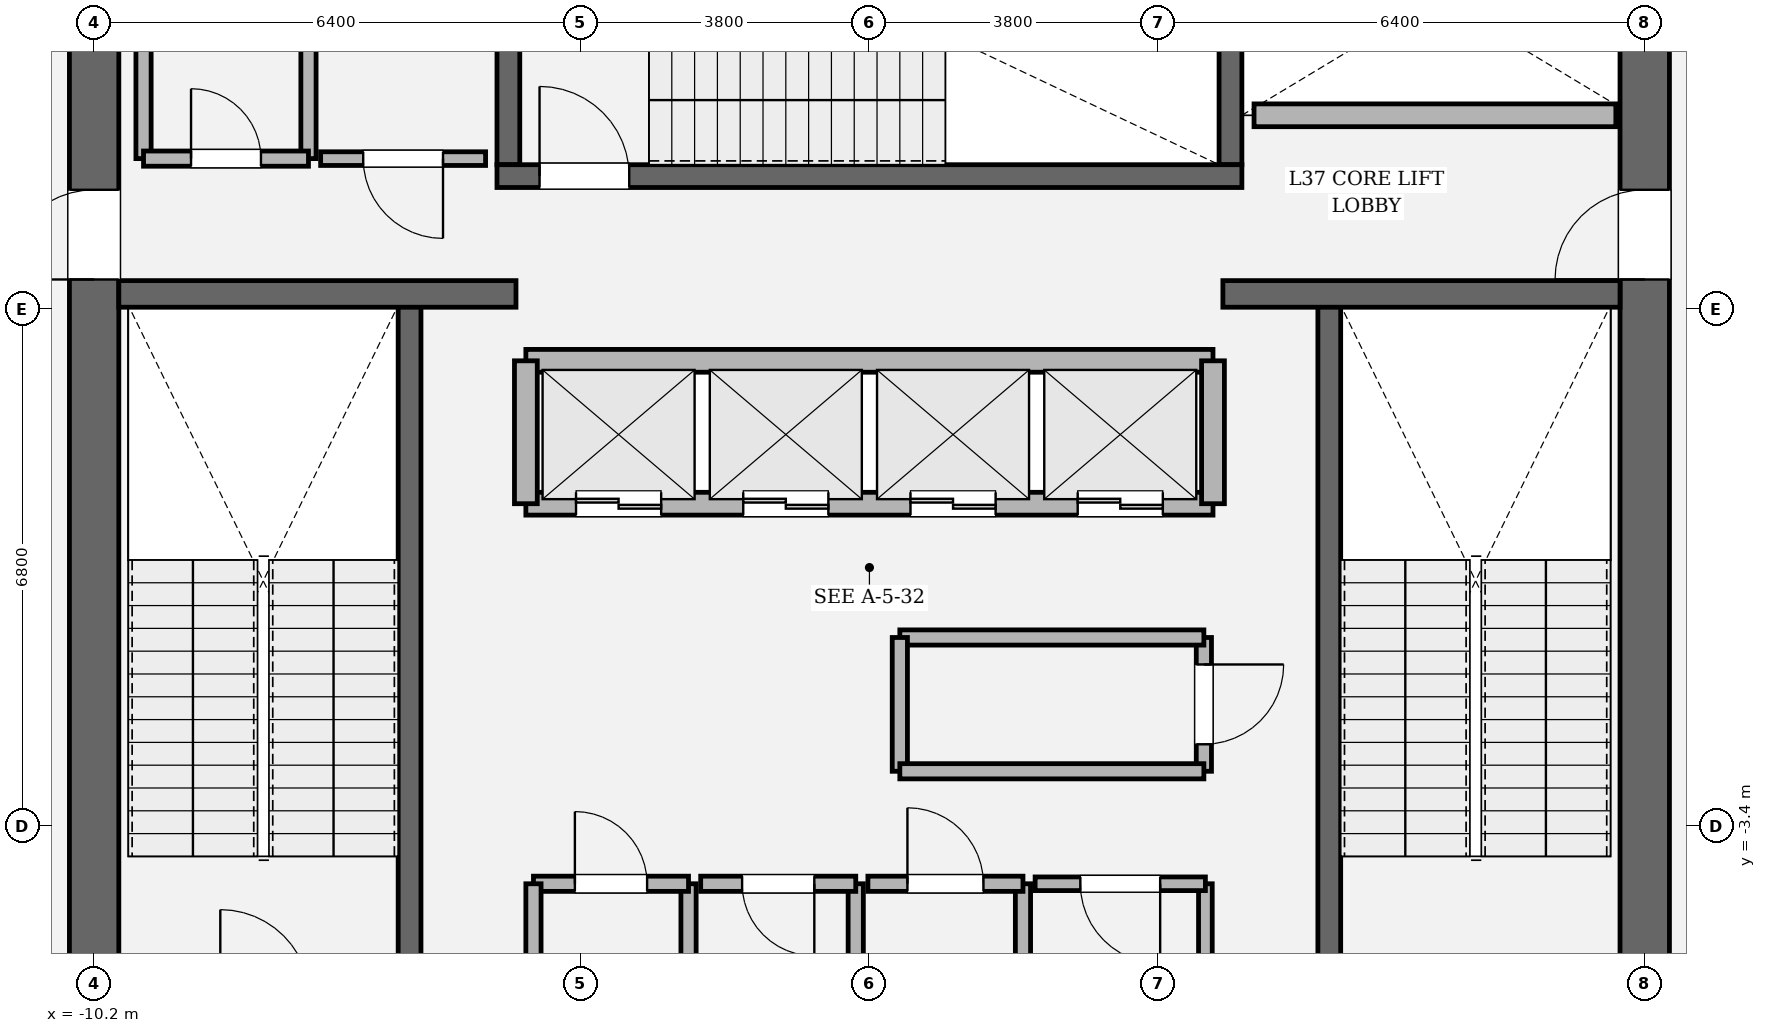
"""IFC4 building model, lengths in metres.
Left out: names, types, materials, properties, quantities, classifications, styles, units other than length and angle.
Written with IfcOpenShell. Run it as: python <this file> out.ifc"""

import sys

from ifc_helpers import new_model, si_unit, direction, frame, frame_2d, origin, place, context, subcontext, project, spatial, rectangle, extrude, element, fill, save


model = new_model("IFC4")
c1 = context("Model", 3, precision=1e-05, world=origin(), true_north=direction((0.0, 1.0)))
c2 = subcontext(c1, "Body", "Model", "MODEL_VIEW")
j1 = project(units=[si_unit("LENGTHUNIT", "METRE"), si_unit("PLANEANGLEUNIT", "RADIAN")], contexts=[c1])
p1 = place(None, origin())
s1 = spatial("IfcSite", under=j1, at=p1, CompositionType="ELEMENT")
p2 = place(p1, origin())
s2 = spatial("IfcBuilding", under=s1, at=p2, CompositionType="ELEMENT")
p3 = place(p2, frame((0.0, 0.0, 160.05)))
s3 = spatial("IfcBuildingStorey", under=s2, at=p3, CompositionType="ELEMENT", Elevation=160.05)
p4 = place(p3, frame((-10.2, -8.875, 0.0), z_axis=(0.0, 0.0, 1.0), x_axis=(0.0, 1.0, 0.0)))
e1 = element("IfcWall", 1, at=p4, inside=s3, PredefinedType="SHEAR", context=c2, shape_type="SweptSolid", body=[
    extrude(rectangle(XDim=17.75, YDim=0.65, at=frame_2d((8.875, 0.0))), origin(), (0.0, 0.0, 1.0), 4.05),
])
p5 = place(p4, frame((12.665, 0.0, 0.0)))
e2 = element("IfcOpeningElement", 2, at=p5, cuts=e1, PredefinedType="OPENING", context=c2, shape_type="SweptSolid", body=[
    extrude(rectangle(XDim=1.18, YDim=2.2, at=frame_2d((0.59, 1.1))), frame((0.0, 0.335, 0.0), z_axis=(0.0, -1.0, 0.0), x_axis=(1.0, 0.0, 0.0)), (0.0, 0.0, 1.0), 0.67),
])
p6 = place(p3, frame((10.2, 8.875, 0.0), z_axis=(0.0, 0.0, 1.0), x_axis=(0.0, -1.0, 0.0)))
e3 = element("IfcWall", 3, at=p6, inside=s3, PredefinedType="SHEAR", context=c2, shape_type="SweptSolid", body=[
    extrude(rectangle(XDim=17.75, YDim=0.65, at=frame_2d((8.875, 0.0))), origin(), (0.0, 0.0, 1.0), 4.05),
])
p7 = place(p6, frame((3.905, 0.0, 0.0)))
e4 = element("IfcOpeningElement", 4, at=p7, cuts=e3, PredefinedType="OPENING", context=c2, shape_type="SweptSolid", body=[
    extrude(rectangle(XDim=1.18, YDim=2.2, at=frame_2d((0.59, 1.1))), frame((0.0, 0.335, 0.0), z_axis=(0.0, -1.0, 0.0), x_axis=(1.0, 0.0, 0.0)), (0.0, 0.0, 1.0), 0.67),
])
for number, where, z_axis, x_axis in (
    (5, (-6.05, -5.5, 0.0), (0.0, 0.0, 1.0), (0.0, 1.0, 0.0)),
    (6, (6.05, 3.45, 0.0), (0.0, 0.0, 1.0), (0.0, -1.0, 0.0)),
):
    element("IfcWall", number, at=place(p3, frame(where, z_axis=z_axis, x_axis=x_axis)), inside=s3, PredefinedType="SOLIDWALL", context=c2, shape_type="SweptSolid", body=[
        extrude(rectangle(XDim=8.95, YDim=0.3, at=frame_2d((4.475, 0.0))), origin(), (0.0, 0.0, 1.0), 4.05),
    ])
for number, where, z_axis, x_axis in (
    (7, (-4.75, 5.3, 0.0), (0.0, 0.0, 1.0), (0.0, 1.0, 0.0)),
    (8, (4.75, 8.875, 0.0), (0.0, 0.0, 1.0), (0.0, -1.0, 0.0)),
):
    element("IfcWall", number, at=place(p3, frame(where, z_axis=z_axis, x_axis=x_axis)), inside=s3, PredefinedType="SOLIDWALL", context=c2, shape_type="SweptSolid", body=[
        extrude(rectangle(XDim=3.575, YDim=0.3, at=frame_2d((1.788, 0.0))), origin(), (0.0, 0.0, 1.0), 4.05),
    ])
p8 = place(p3, frame((-4.9, 5.15, 0.0), z_axis=(0.0, 0.0, 1.0), x_axis=(1.0, 0.0, 0.0)))
e9 = element("IfcWall", 9, at=p8, inside=s3, PredefinedType="SOLIDWALL", context=c2, shape_type="SweptSolid", body=[
    extrude(rectangle(XDim=9.8, YDim=0.3, at=frame_2d((4.9, 0.0))), origin(), (0.0, 0.0, 1.0), 4.05),
])
p9 = place(p8, frame((0.56, 0.0, 0.0)))
e10 = element("IfcOpeningElement", 10, at=p9, cuts=e9, PredefinedType="OPENING", context=c2, shape_type="SweptSolid", body=[
    extrude(rectangle(XDim=1.18, YDim=2.2, at=frame_2d((0.59, 1.1))), frame((0.0, 0.16, 0.0), z_axis=(0.0, -1.0, 0.0), x_axis=(1.0, 0.0, 0.0)), (0.0, 0.0, 1.0), 0.32),
])
for number, where, z_axis, x_axis in (
    (11, (-9.875, 3.6, 0.0), (0.0, 0.0, 1.0), (1.0, 0.0, 0.0)),
    (12, (4.65, 3.6, 0.0), (0.0, 0.0, 1.0), (1.0, 0.0, 0.0)),
):
    element("IfcWall", number, at=place(p3, frame(where, z_axis=z_axis, x_axis=x_axis)), inside=s3, PredefinedType="SOLIDWALL", context=c2, shape_type="SweptSolid", body=[
        extrude(rectangle(XDim=5.225, YDim=0.35, at=frame_2d((2.613, 0.0))), origin(), (0.0, 0.0, 1.0), 4.05),
    ])
p10 = place(p3, frame((-4.52, 0.84, 0.0), z_axis=(0.0, 0.0, 1.0), x_axis=(1.0, 0.0, 0.0)))
e13 = element("IfcWall", 13, at=p10, inside=s3, PredefinedType="SOLIDWALL", context=c2, shape_type="SweptSolid", body=[
    extrude(rectangle(XDim=9.04, YDim=0.3, at=frame_2d((4.52, 0.0))), origin(), (0.0, 0.0, 1.0), 3.83),
])
p11 = place(p10, frame((0.66, 0.0, 0.0)))
e14 = element("IfcOpeningElement", 14, at=p11, cuts=e13, PredefinedType="OPENING", context=c2, shape_type="SweptSolid", body=[
    extrude(rectangle(XDim=1.12, YDim=2.25, at=frame_2d((0.56, 1.125))), frame((0.0, 0.16, 0.0), z_axis=(0.0, -1.0, 0.0), x_axis=(1.0, 0.0, 0.0)), (0.0, 0.0, 1.0), 0.32),
])
p12 = place(p10, frame((2.86, 0.0, 0.0)))
e15 = element("IfcOpeningElement", 15, at=p12, cuts=e13, PredefinedType="OPENING", context=c2, shape_type="SweptSolid", body=[
    extrude(rectangle(XDim=1.12, YDim=2.25, at=frame_2d((0.56, 1.125))), frame((0.0, 0.16, 0.0), z_axis=(0.0, -1.0, 0.0), x_axis=(1.0, 0.0, 0.0)), (0.0, 0.0, 1.0), 0.32),
])
p13 = place(p10, frame((5.06, 0.0, 0.0)))
e16 = element("IfcOpeningElement", 16, at=p13, cuts=e13, PredefinedType="OPENING", context=c2, shape_type="SweptSolid", body=[
    extrude(rectangle(XDim=1.12, YDim=2.25, at=frame_2d((0.56, 1.125))), frame((0.0, 0.16, 0.0), z_axis=(0.0, -1.0, 0.0), x_axis=(1.0, 0.0, 0.0)), (0.0, 0.0, 1.0), 0.32),
])
p14 = place(p10, frame((7.26, 0.0, 0.0)))
e17 = element("IfcOpeningElement", 17, at=p14, cuts=e13, PredefinedType="OPENING", context=c2, shape_type="SweptSolid", body=[
    extrude(rectangle(XDim=1.12, YDim=2.25, at=frame_2d((0.56, 1.125))), frame((0.0, 0.16, 0.0), z_axis=(0.0, -1.0, 0.0), x_axis=(1.0, 0.0, 0.0)), (0.0, 0.0, 1.0), 0.32),
])
p15 = place(p3, frame((-4.52, 2.72, 0.0), z_axis=(0.0, 0.0, 1.0), x_axis=(1.0, 0.0, 0.0)))
e18 = element("IfcWall", 18, at=p15, inside=s3, PredefinedType="SOLIDWALL", context=c2, shape_type="SweptSolid", body=[
    extrude(rectangle(XDim=9.04, YDim=0.3, at=frame_2d((4.52, 0.0))), origin(), (0.0, 0.0, 1.0), 3.83),
])
for number, where, z_axis, x_axis in (
    (19, (-4.52, 0.84, 0.0), (0.0, 0.0, 1.0), (0.0, 1.0, 0.0)),
    (20, (4.52, 0.84, 0.0), (0.0, 0.0, 1.0), (0.0, 1.0, 0.0)),
):
    element("IfcWall", number, at=place(p3, frame(where, z_axis=z_axis, x_axis=x_axis)), inside=s3, PredefinedType="SOLIDWALL", context=c2, shape_type="SweptSolid", body=[
        extrude(rectangle(XDim=1.88, YDim=0.3, at=frame_2d((0.94, 0.0))), origin(), (0.0, 0.0, 1.0), 3.83),
    ])
p16 = place(p3, frame((5.06, 5.95, 0.0), z_axis=(0.0, 0.0, 1.0), x_axis=(1.0, 0.0, 0.0)))
e21 = element("IfcWall", 21, at=p16, inside=s3, PredefinedType="SOLIDWALL", context=c2, shape_type="SweptSolid", body=[
    extrude(rectangle(XDim=4.76, YDim=0.3, at=frame_2d((2.38, 0.0))), origin(), (0.0, 0.0, 1.0), 3.83),
])
p17 = place(p3, frame((-2.38, -5.9, 0.0), z_axis=(0.0, 0.0, 1.0), x_axis=(0.0, 1.0, 0.0)))
e22 = element("IfcWall", 22, at=p17, inside=s3, PredefinedType="SOLIDWALL", context=c2, shape_type="SweptSolid", body=[
    extrude(rectangle(XDim=1.74, YDim=0.2, at=frame_2d((0.87, 0.0))), origin(), (0.0, 0.0, 1.0), 3.83),
])
p18 = place(p3, frame((-2.38, -4.16, 0.0), z_axis=(0.0, 0.0, 1.0), x_axis=(-1.0, 0.0, 0.0)))
e23 = element("IfcWall", 23, at=p18, inside=s3, PredefinedType="SOLIDWALL", context=c2, shape_type="SweptSolid", body=[
    extrude(rectangle(XDim=2.04, YDim=0.2, at=frame_2d((1.02, 0.0))), origin(), (0.0, 0.0, 1.0), 3.83),
])
p19 = place(p18, frame((0.545, 0.0, 0.0)))
e24 = element("IfcOpeningElement", 24, at=p19, cuts=e23, PredefinedType="OPENING", context=c2, shape_type="SweptSolid", body=[
    extrude(rectangle(XDim=0.95, YDim=2.15, at=frame_2d((0.475, 1.075))), frame((0.0, 0.11, 0.0), z_axis=(0.0, -1.0, 0.0), x_axis=(1.0, 0.0, 0.0)), (0.0, 0.0, 1.0), 0.22),
])
for number, where, z_axis, x_axis in (
    (25, (-4.42, -4.16, 0.0), (0.0, 0.0, 1.0), (0.0, -1.0, 0.0)),
    (26, (-0.18, -5.9, 0.0), (0.0, 0.0, 1.0), (0.0, 1.0, 0.0)),
):
    element("IfcWall", number, at=place(p3, frame(where, z_axis=z_axis, x_axis=x_axis)), inside=s3, PredefinedType="SOLIDWALL", context=c2, shape_type="SweptSolid", body=[
        extrude(rectangle(XDim=1.74, YDim=0.2, at=frame_2d((0.87, 0.0))), origin(), (0.0, 0.0, 1.0), 3.83),
    ])
p20 = place(p3, frame((-0.18, -4.16, 0.0), z_axis=(0.0, 0.0, 1.0), x_axis=(-1.0, 0.0, 0.0)))
e27 = element("IfcWall", 27, at=p20, inside=s3, PredefinedType="SOLIDWALL", context=c2, shape_type="SweptSolid", body=[
    extrude(rectangle(XDim=2.04, YDim=0.2, at=frame_2d((1.02, 0.0))), origin(), (0.0, 0.0, 1.0), 3.83),
])
p21 = place(p20, frame((0.545, 0.0, 0.0)))
e28 = element("IfcOpeningElement", 28, at=p21, cuts=e27, PredefinedType="OPENING", context=c2, shape_type="SweptSolid", body=[
    extrude(rectangle(XDim=0.95, YDim=2.15, at=frame_2d((0.475, 1.075))), frame((0.0, 0.11, 0.0), z_axis=(0.0, -1.0, 0.0), x_axis=(1.0, 0.0, 0.0)), (0.0, 0.0, 1.0), 0.22),
])
p22 = place(p3, frame((2.02, -5.9, 0.0), z_axis=(0.0, 0.0, 1.0), x_axis=(0.0, 1.0, 0.0)))
e29 = element("IfcWall", 29, at=p22, inside=s3, PredefinedType="SOLIDWALL", context=c2, shape_type="SweptSolid", body=[
    extrude(rectangle(XDim=1.74, YDim=0.2, at=frame_2d((0.87, 0.0))), origin(), (0.0, 0.0, 1.0), 3.83),
])
p23 = place(p3, frame((2.02, -4.16, 0.0), z_axis=(0.0, 0.0, 1.0), x_axis=(-1.0, 0.0, 0.0)))
e30 = element("IfcWall", 30, at=p23, inside=s3, PredefinedType="SOLIDWALL", context=c2, shape_type="SweptSolid", body=[
    extrude(rectangle(XDim=2.04, YDim=0.2, at=frame_2d((1.02, 0.0))), origin(), (0.0, 0.0, 1.0), 3.83),
])
p24 = place(p23, frame((0.52, 0.0, 0.0)))
e31 = element("IfcOpeningElement", 31, at=p24, cuts=e30, PredefinedType="OPENING", context=c2, shape_type="SweptSolid", body=[
    extrude(rectangle(XDim=1.0, YDim=2.15, at=frame_2d((0.5, 1.075))), frame((0.0, 0.11, 0.0), z_axis=(0.0, -1.0, 0.0), x_axis=(1.0, 0.0, 0.0)), (0.0, 0.0, 1.0), 0.22),
])
p25 = place(p3, frame((4.42, -5.9, 0.0), z_axis=(0.0, 0.0, 1.0), x_axis=(0.0, 1.0, 0.0)))
e32 = element("IfcWall", 32, at=p25, inside=s3, PredefinedType="PARTITIONING", context=c2, shape_type="SweptSolid", body=[
    extrude(rectangle(XDim=1.74, YDim=0.18, at=frame_2d((0.87, 0.0))), origin(), (0.0, 0.0, 1.0), 3.83),
])
p26 = place(p3, frame((4.42, -4.16, 0.0), z_axis=(0.0, 0.0, 1.0), x_axis=(-1.0, 0.0, 0.0)))
e33 = element("IfcWall", 33, at=p26, inside=s3, PredefinedType="PARTITIONING", context=c2, shape_type="SweptSolid", body=[
    extrude(rectangle(XDim=2.24, YDim=0.18, at=frame_2d((1.12, 0.0))), origin(), (0.0, 0.0, 1.0), 3.83),
])
p27 = place(p26, frame((0.595, 0.0, 0.0)))
e34 = element("IfcOpeningElement", 34, at=p27, cuts=e33, PredefinedType="OPENING", context=c2, shape_type="SweptSolid", body=[
    extrude(rectangle(XDim=1.05, YDim=2.2, at=frame_2d((0.525, 1.1))), frame((0.0, 0.1, 0.0), z_axis=(0.0, -1.0, 0.0), x_axis=(1.0, 0.0, 0.0)), (0.0, 0.0, 1.0), 0.2),
])
p28 = place(p3, frame((4.4, -2.68, 0.0), z_axis=(0.0, 0.0, 1.0), x_axis=(0.0, 1.0, 0.0)))
e35 = element("IfcWall", 35, at=p28, inside=s3, PredefinedType="SOLIDWALL", context=c2, shape_type="SweptSolid", body=[
    extrude(rectangle(XDim=1.76, YDim=0.2, at=frame_2d((0.88, 0.0))), origin(), (0.0, 0.0, 1.0), 3.83),
])
p29 = place(p28, frame((0.355, 0.0, 0.0)))
e36 = element("IfcOpeningElement", 36, at=p29, cuts=e35, PredefinedType="OPENING", context=c2, shape_type="SweptSolid", body=[
    extrude(rectangle(XDim=1.05, YDim=2.2, at=frame_2d((0.525, 1.1))), frame((0.0, 0.11, 0.0), z_axis=(0.0, -1.0, 0.0), x_axis=(1.0, 0.0, 0.0)), (0.0, 0.0, 1.0), 0.22),
])
p30 = place(p3, frame((4.4, -0.92, 0.0), z_axis=(0.0, 0.0, 1.0), x_axis=(-1.0, 0.0, 0.0)))
e37 = element("IfcWall", 37, at=p30, inside=s3, PredefinedType="SOLIDWALL", context=c2, shape_type="SweptSolid", body=[
    extrude(rectangle(XDim=4.0, YDim=0.2, at=frame_2d((2.0, 0.0))), origin(), (0.0, 0.0, 1.0), 3.83),
])
p31 = place(p3, frame((0.4, -0.92, 0.0), z_axis=(0.0, 0.0, 1.0), x_axis=(0.0, -1.0, 0.0)))
e38 = element("IfcWall", 38, at=p31, inside=s3, PredefinedType="SOLIDWALL", context=c2, shape_type="SweptSolid", body=[
    extrude(rectangle(XDim=1.76, YDim=0.2, at=frame_2d((0.88, 0.0))), origin(), (0.0, 0.0, 1.0), 3.83),
])
p32 = place(p3, frame((0.4, -2.68, 0.0), z_axis=(0.0, 0.0, 1.0), x_axis=(1.0, 0.0, 0.0)))
e39 = element("IfcWall", 39, at=p32, inside=s3, PredefinedType="SOLIDWALL", context=c2, shape_type="SweptSolid", body=[
    extrude(rectangle(XDim=4.0, YDim=0.2, at=frame_2d((2.0, 0.0))), origin(), (0.0, 0.0, 1.0), 3.83),
])
for number, where, z_axis, x_axis in (
    (40, (-7.38, 5.38, 0.0), (0.0, 0.0, 1.0), (0.0, 1.0, 0.0)),
    (41, (-9.55, 8.65, 0.0), (0.0, 0.0, 1.0), (0.0, -1.0, 0.0)),
):
    element("IfcWall", number, at=place(p3, frame(where, z_axis=z_axis, x_axis=x_axis)), inside=s3, PredefinedType="SOLIDWALL", context=c2, shape_type="SweptSolid", body=[
        extrude(rectangle(XDim=3.27, YDim=0.2, at=frame_2d((1.635, 0.0))), origin(), (0.0, 0.0, 1.0), 3.83),
    ])
p33 = place(p3, frame((-9.55, 5.38, 0.0), z_axis=(0.0, 0.0, 1.0), x_axis=(1.0, 0.0, 0.0)))
e42 = element("IfcWall", 42, at=p33, inside=s3, PredefinedType="SOLIDWALL", context=c2, shape_type="SweptSolid", body=[
    extrude(rectangle(XDim=2.17, YDim=0.2, at=frame_2d((1.085, 0.0))), origin(), (0.0, 0.0, 1.0), 3.83),
])
p34 = place(p33, frame((0.625, 0.0, 0.0)))
e43 = element("IfcOpeningElement", 43, at=p34, cuts=e42, PredefinedType="OPENING", context=c2, shape_type="SweptSolid", body=[
    extrude(rectangle(XDim=0.92, YDim=2.1, at=frame_2d((0.46, 1.05))), frame((0.0, 0.11, 0.0), z_axis=(0.0, -1.0, 0.0), x_axis=(1.0, 0.0, 0.0)), (0.0, 0.0, 1.0), 0.22),
])
p35 = place(p3, frame((-7.22, 5.38, 0.0), z_axis=(0.0, 0.0, 1.0), x_axis=(1.0, 0.0, 0.0)))
e44 = element("IfcWall", 44, at=p35, inside=s3, PredefinedType="PARTITIONING", context=c2, shape_type="SweptSolid", body=[
    extrude(rectangle(XDim=2.17, YDim=0.18, at=frame_2d((1.085, 0.0))), origin(), (0.0, 0.0, 1.0), 3.83),
])
p36 = place(p35, frame((0.56, 0.0, 0.0)))
e45 = element("IfcOpeningElement", 45, at=p36, cuts=e44, PredefinedType="OPENING", context=c2, shape_type="SweptSolid", body=[
    extrude(rectangle(XDim=1.05, YDim=2.2, at=frame_2d((0.525, 1.1))), frame((0.0, 0.1, 0.0), z_axis=(0.0, -1.0, 0.0), x_axis=(1.0, 0.0, 0.0)), (0.0, 0.0, 1.0), 0.2),
])
p37 = place(p9, origin())
e46 = element("IfcDoor", 46, at=p37, inside=s3, OperationType="SINGLE_SWING_LEFT", PredefinedType="DOOR", context=c2, shape_type="SweptSolid", body=[
    extrude(rectangle(XDim=1.18, YDim=2.2, at=frame_2d((0.59, 1.1))), frame((0.0, 0.025, 0.0), z_axis=(0.0, -1.0, 0.0), x_axis=(1.0, 0.0, 0.0)), (0.0, 0.0, 1.0), 0.05),
])
fill(e10, e46)
p38 = place(p5, origin())
e47 = element("IfcDoor", 47, at=p38, inside=s3, OperationType="SINGLE_SWING_LEFT", PredefinedType="DOOR", context=c2, shape_type="SweptSolid", body=[
    extrude(rectangle(XDim=1.18, YDim=2.2, at=frame_2d((0.59, 1.1))), frame((0.0, 0.025, 0.0), z_axis=(0.0, -1.0, 0.0), x_axis=(1.0, 0.0, 0.0)), (0.0, 0.0, 1.0), 0.05),
])
fill(e2, e47)
p39 = place(p7, origin())
e48 = element("IfcDoor", 48, at=p39, inside=s3, OperationType="SINGLE_SWING_RIGHT", PredefinedType="DOOR", context=c2, shape_type="SweptSolid", body=[
    extrude(rectangle(XDim=1.18, YDim=2.2, at=frame_2d((0.59, 1.1))), frame((0.0, 0.025, 0.0), z_axis=(0.0, -1.0, 0.0), x_axis=(1.0, 0.0, 0.0)), (0.0, 0.0, 1.0), 0.05),
])
fill(e4, e48)
p40 = place(p11, origin())
e49 = element("IfcDoor", 49, at=p40, inside=s3, OperationType="DOUBLE_DOOR_SLIDING", PredefinedType="DOOR", context=c2, shape_type="SweptSolid", body=[
    extrude(rectangle(XDim=1.12, YDim=2.25, at=frame_2d((0.56, 1.125))), frame((0.0, 0.025, 0.0), z_axis=(0.0, -1.0, 0.0), x_axis=(1.0, 0.0, 0.0)), (0.0, 0.0, 1.0), 0.05),
])
fill(e14, e49)
p41 = place(p12, origin())
e50 = element("IfcDoor", 50, at=p41, inside=s3, OperationType="DOUBLE_DOOR_SLIDING", PredefinedType="DOOR", context=c2, shape_type="SweptSolid", body=[
    extrude(rectangle(XDim=1.12, YDim=2.25, at=frame_2d((0.56, 1.125))), frame((0.0, 0.025, 0.0), z_axis=(0.0, -1.0, 0.0), x_axis=(1.0, 0.0, 0.0)), (0.0, 0.0, 1.0), 0.05),
])
fill(e15, e50)
p42 = place(p13, origin())
e51 = element("IfcDoor", 51, at=p42, inside=s3, OperationType="DOUBLE_DOOR_SLIDING", PredefinedType="DOOR", context=c2, shape_type="SweptSolid", body=[
    extrude(rectangle(XDim=1.12, YDim=2.25, at=frame_2d((0.56, 1.125))), frame((0.0, 0.025, 0.0), z_axis=(0.0, -1.0, 0.0), x_axis=(1.0, 0.0, 0.0)), (0.0, 0.0, 1.0), 0.05),
])
fill(e16, e51)
p43 = place(p14, origin())
e52 = element("IfcDoor", 52, at=p43, inside=s3, OperationType="DOUBLE_DOOR_SLIDING", PredefinedType="DOOR", context=c2, shape_type="SweptSolid", body=[
    extrude(rectangle(XDim=1.12, YDim=2.25, at=frame_2d((0.56, 1.125))), frame((0.0, 0.025, 0.0), z_axis=(0.0, -1.0, 0.0), x_axis=(1.0, 0.0, 0.0)), (0.0, 0.0, 1.0), 0.05),
])
fill(e17, e52)
p44 = place(p19, origin())
e53 = element("IfcDoor", 53, at=p44, inside=s3, OperationType="SINGLE_SWING_RIGHT", PredefinedType="DOOR", context=c2, shape_type="SweptSolid", body=[
    extrude(rectangle(XDim=0.95, YDim=2.15, at=frame_2d((0.475, 1.075))), frame((0.0, 0.025, 0.0), z_axis=(0.0, -1.0, 0.0), x_axis=(1.0, 0.0, 0.0)), (0.0, 0.0, 1.0), 0.05),
])
fill(e24, e53)
p45 = place(p21, origin())
e54 = element("IfcDoor", 54, at=p45, inside=s3, OperationType="SINGLE_SWING_LEFT", PredefinedType="DOOR", context=c2, shape_type="SweptSolid", body=[
    extrude(rectangle(XDim=0.95, YDim=2.15, at=frame_2d((0.475, 1.075))), frame((0.0, 0.025, 0.0), z_axis=(0.0, -1.0, 0.0), x_axis=(1.0, 0.0, 0.0)), (0.0, 0.0, 1.0), 0.05),
])
fill(e28, e54)
p46 = place(p24, origin())
e55 = element("IfcDoor", 55, at=p46, inside=s3, OperationType="SINGLE_SWING_RIGHT", PredefinedType="DOOR", context=c2, shape_type="SweptSolid", body=[
    extrude(rectangle(XDim=1.0, YDim=2.15, at=frame_2d((0.5, 1.075))), frame((0.0, 0.025, 0.0), z_axis=(0.0, -1.0, 0.0), x_axis=(1.0, 0.0, 0.0)), (0.0, 0.0, 1.0), 0.05),
])
fill(e31, e55)
p47 = place(p27, origin())
e56 = element("IfcDoor", 56, at=p47, inside=s3, OperationType="SINGLE_SWING_LEFT", PredefinedType="DOOR", context=c2, shape_type="SweptSolid", body=[
    extrude(rectangle(XDim=1.05, YDim=2.2, at=frame_2d((0.525, 1.1))), frame((0.0, 0.025, 0.0), z_axis=(0.0, -1.0, 0.0), x_axis=(1.0, 0.0, 0.0)), (0.0, 0.0, 1.0), 0.05),
])
fill(e34, e56)
p48 = place(p29, origin())
e57 = element("IfcDoor", 57, at=p48, inside=s3, OperationType="SINGLE_SWING_RIGHT", PredefinedType="DOOR", context=c2, shape_type="SweptSolid", body=[
    extrude(rectangle(XDim=1.05, YDim=2.2, at=frame_2d((0.525, 1.1))), frame((0.0, 0.025, 0.0), z_axis=(0.0, -1.0, 0.0), x_axis=(1.0, 0.0, 0.0)), (0.0, 0.0, 1.0), 0.05),
])
fill(e36, e57)
p49 = place(p34, origin())
e58 = element("IfcDoor", 58, at=p49, inside=s3, OperationType="SINGLE_SWING_LEFT", PredefinedType="DOOR", context=c2, shape_type="SweptSolid", body=[
    extrude(rectangle(XDim=0.92, YDim=2.1, at=frame_2d((0.46, 1.05))), frame((0.0, 0.025, 0.0), z_axis=(0.0, -1.0, 0.0), x_axis=(1.0, 0.0, 0.0)), (0.0, 0.0, 1.0), 0.05),
])
fill(e43, e58)
p50 = place(p36, origin())
e59 = element("IfcDoor", 59, at=p50, inside=s3, OperationType="SINGLE_SWING_RIGHT", PredefinedType="DOOR", context=c2, shape_type="SweptSolid", body=[
    extrude(rectangle(XDim=1.05, YDim=2.2, at=frame_2d((0.525, 1.1))), frame((0.0, 0.025, 0.0), z_axis=(0.0, -1.0, 0.0), x_axis=(1.0, 0.0, 0.0)), (0.0, 0.0, 1.0), 0.05),
])
fill(e45, e59)
save(model, sys.argv[1])
